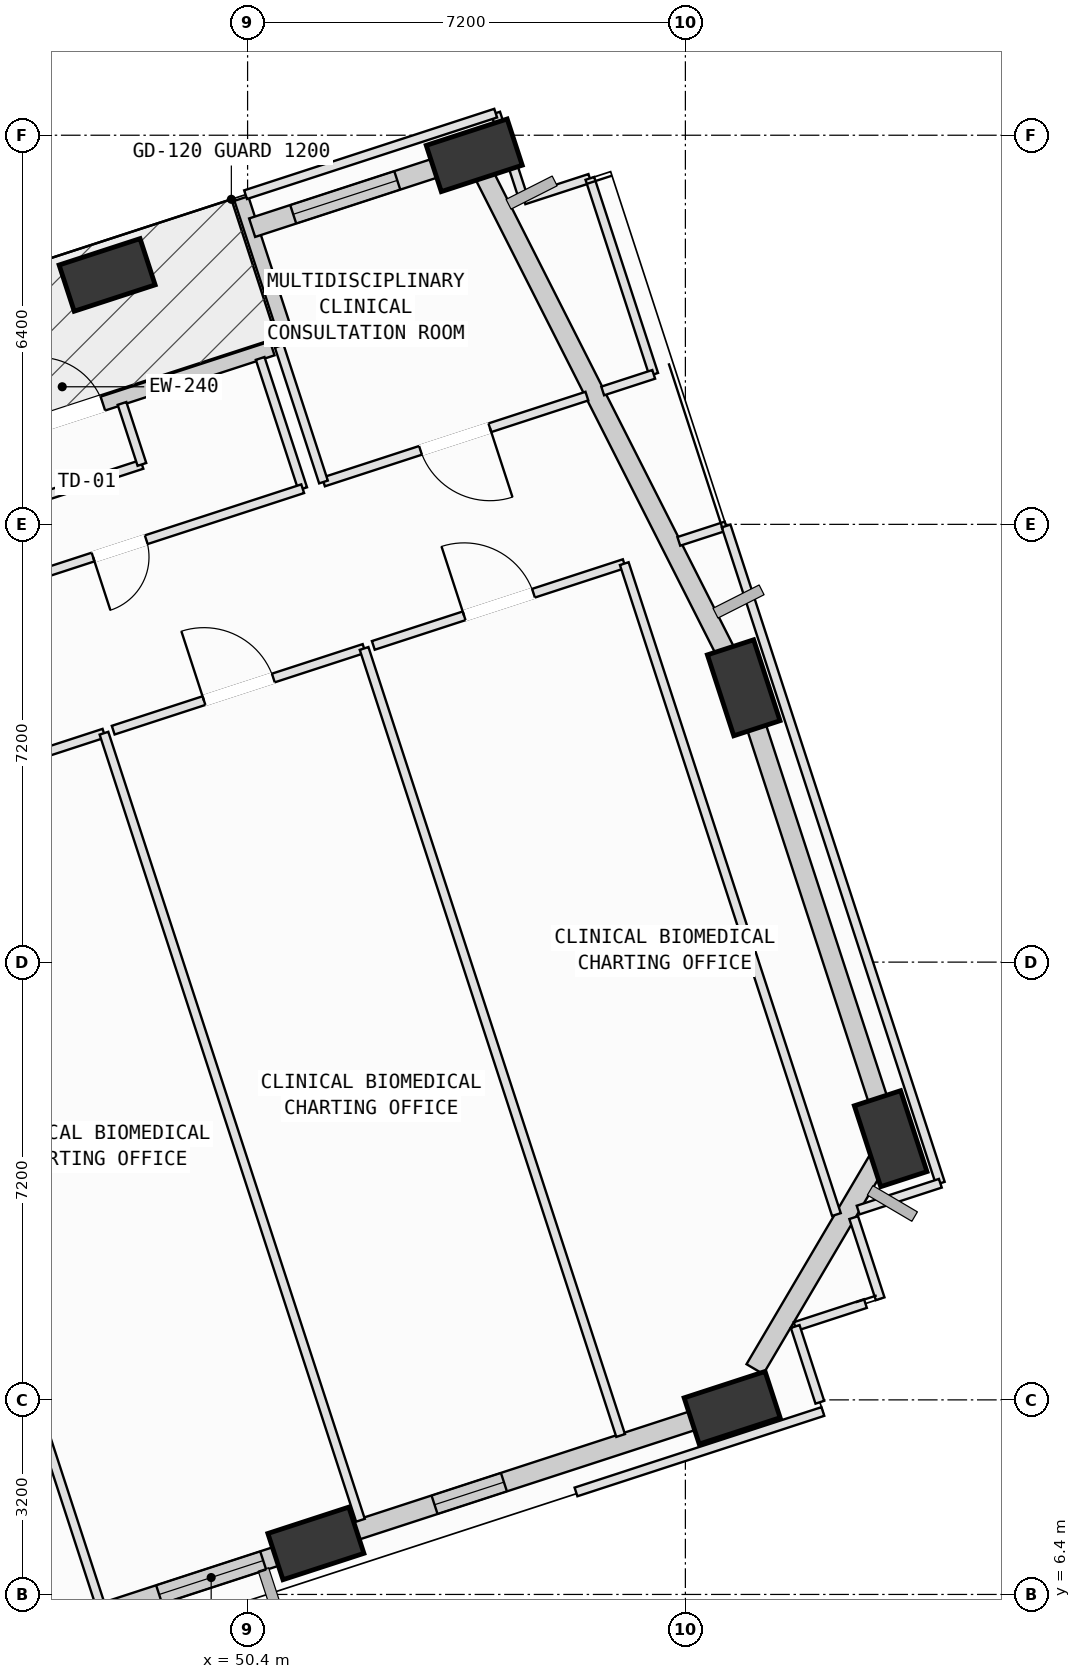
"""IFC4 building model, lengths in metres.
Left out: names, types, materials, properties, quantities, classifications, styles, units other than length and angle.
Written with IfcOpenShell. Run it as: python <this file> out.ifc"""

import sys

from ifc_helpers import new_model, si_unit, direction, frame, frame_2d, origin, origin_2d, place, context, subcontext, project, spatial, rectangle, extrude, element, fill, save


model = new_model("IFC4")
c1 = context("Model", 3, precision=1e-05, world=origin(), true_north=direction((0.0, 1.0)))
c2 = subcontext(c1, "Body", "Model", "MODEL_VIEW")
j1 = project(units=[si_unit("LENGTHUNIT", "METRE"), si_unit("PLANEANGLEUNIT", "RADIAN")], contexts=[c1])
p1 = place(None, origin())
s1 = spatial("IfcSite", under=j1, at=p1, CompositionType="ELEMENT")
p2 = place(p1, origin())
s2 = spatial("IfcBuilding", under=s1, at=p2, CompositionType="ELEMENT")
p3 = place(p2, frame((0.0, 0.0, 100.4)))
s3 = spatial("IfcBuildingStorey", under=s2, at=p3, CompositionType="ELEMENT", Elevation=100.4)
p4 = place(p3, frame((51.523, 7.239, 0.002), z_axis=(0.071761563641, 0.074495916193, 0.994635931612), x_axis=(-0.898565105275, 0.437668320266, 0.032049852079)))
e1 = element("IfcColumn", 1, at=p4, inside=s3, PredefinedType="COLUMN", context=c2, shape_type="SweptSolid", body=[
    extrude(rectangle(XDim=1.4, YDim=0.8, at=origin_2d()), origin(), (0.0, 0.0, 1.0), 4.018),
])
p5 = place(p3, frame((58.369, 9.47, 0.002), z_axis=(0.062287627487, 0.102498627511, 0.992781085044), x_axis=(-0.972270727829, 0.230886401059, 0.037163175496)))
e2 = element("IfcColumn", 2, at=p5, inside=s3, PredefinedType="COLUMN", context=c2, shape_type="SweptSolid", body=[
    extrude(rectangle(XDim=1.4, YDim=0.8, at=origin_2d()), origin(), (0.0, 0.0, 1.0), 4.025),
])
p6 = place(p3, frame((60.976, 13.896, 0.002), z_axis=(0.043903862895, 0.112973614052, 0.992627530019), x_axis=(-0.053058431268, -0.991919647374, 0.115239819616)))
e3 = element("IfcColumn", 3, at=p6, inside=s3, PredefinedType="COLUMN", context=c2, shape_type="SweptSolid", body=[
    extrude(rectangle(XDim=1.4, YDim=0.8, at=origin_2d()), origin(), (0.0, 0.0, 1.0), 4.026),
])
p7 = place(p3, frame((58.559, 21.312, 0.002), z_axis=(0.013549612723, 0.102989208816, 0.994590182368), x_axis=(0.183850511689, -0.977979831198, 0.098764564101)))
e4 = element("IfcColumn", 4, at=p7, inside=s3, PredefinedType="COLUMN", context=c2, shape_type="SweptSolid", body=[
    extrude(rectangle(XDim=1.4, YDim=0.8, at=origin_2d()), origin(), (0.0, 0.0, 1.0), 4.018),
])
p8 = place(p3, frame((54.127, 30.07, 0.002), z_axis=(-0.02245610829, 0.084590760225, 0.99616270081), x_axis=(-0.839761275126, -0.542278170496, 0.027118012491)))
e5 = element("IfcColumn", 5, at=p8, inside=s3, PredefinedType="COLUMN", context=c2, shape_type="SweptSolid", body=[
    extrude(rectangle(XDim=1.4, YDim=0.8, at=origin_2d()), origin(), (0.0, 0.0, 1.0), 4.012),
])
p9 = place(p3, frame((48.09, 28.102, 0.002), z_axis=(-0.014146332364, 0.059817034695, 0.998109114096), x_axis=(-0.854089030519, -0.519778031459, 0.019045365861)))
e6 = element("IfcColumn", 6, at=p9, inside=s3, PredefinedType="COLUMN", context=c2, shape_type="SweptSolid", body=[
    extrude(rectangle(XDim=1.4, YDim=0.8, at=origin_2d()), origin(), (0.0, 0.0, 1.0), 4.004),
])
p10 = place(p3, frame((44.188, 24.738, 0.0), z_axis=(0.0, 0.0, 1.0), x_axis=(0.950787586952, 0.309843451597, 0.0)))
e7 = element("IfcWall", 7, at=p10, inside=s3, PredefinedType="SOLIDWALL", context=c2, shape_type="SweptSolid", body=[
    extrude(rectangle(XDim=6.96, YDim=0.24, at=frame_2d((3.48, 0.0))), origin(), (0.0, 0.0, 1.0), 2.945),
])
p11 = place(p10, frame((2.93, 0.0, 0.0)))
e8 = element("IfcOpeningElement", 8, at=p11, cuts=e7, PredefinedType="OPENING", context=c2, shape_type="SweptSolid", body=[
    extrude(rectangle(XDim=1.1, YDim=2.15, at=frame_2d((0.55, 1.075))), frame((0.0, 0.13, 0.0), z_axis=(0.0, -1.0, 0.0), x_axis=(1.0, 0.0, 0.0)), (0.0, 0.0, 1.0), 0.26),
])
p12 = place(p3, frame((51.072, 26.981, 0.0), z_axis=(0.0, 0.0, 1.0), x_axis=(-0.309774960552, 0.950809904142, 0.0)))
e9 = element("IfcWall", 9, at=p12, inside=s3, PredefinedType="SOLIDWALL", context=c2, shape_type="SweptSolid", body=[
    extrude(rectangle(XDim=2.5, YDim=0.24, at=frame_2d((1.25, 0.0))), origin(), (0.0, 0.0, 1.0), 3.165),
])
p13 = place(p3, frame((51.235, 7.146, 0.0), z_axis=(0.0, 0.0, 1.0), x_axis=(-0.950785923173, -0.309848557034, 0.0)))
e10 = element("IfcWall", 10, at=p13, inside=s3, PredefinedType="SOLIDWALL", context=c2, shape_type="SweptSolid", body=[
    extrude(rectangle(XDim=6.219, YDim=0.32, at=frame_2d((3.109, 0.0))), origin(), (0.0, 0.0, 1.0), 3.165),
])
p14 = place(p13, frame((0.608, 0.0, 0.75)))
e11 = element("IfcOpeningElement", 11, at=p14, cuts=e10, PredefinedType="OPENING", context=c2, shape_type="SweptSolid", body=[
    extrude(rectangle(XDim=1.8, YDim=2.05, at=frame_2d((0.9, 1.025))), frame((0.0, 0.17, 0.0), z_axis=(0.0, -1.0, 0.0), x_axis=(1.0, 0.0, 0.0)), (0.0, 0.0, 1.0), 0.34),
])
p15 = place(p3, frame((58.096, 9.381, 0.0), z_axis=(0.0, 0.0, 1.0), x_axis=(-0.950793220237, -0.309826164729, 0.0)))
e12 = element("IfcWall", 12, at=p15, inside=s3, PredefinedType="SOLIDWALL", context=c2, shape_type="SweptSolid", body=[
    extrude(rectangle(XDim=6.242, YDim=0.32, at=frame_2d((3.121, 0.0))), origin(), (0.0, 0.0, 1.0), 3.165),
])
p16 = place(p15, frame((3.66, 0.0, 0.75)))
e13 = element("IfcOpeningElement", 13, at=p16, cuts=e12, PredefinedType="OPENING", context=c2, shape_type="SweptSolid", body=[
    extrude(rectangle(XDim=1.2, YDim=1.75, at=frame_2d((0.6, 0.875))), frame((0.0, 0.17, 0.0), z_axis=(0.0, -1.0, 0.0), x_axis=(1.0, 0.0, 0.0)), (0.0, 0.0, 1.0), 0.34),
])
p17 = place(p3, frame((60.847, 13.677, 0.0), z_axis=(0.0, 0.0, 1.0), x_axis=(-0.507532261073, -0.861632754699, 0.0)))
e14 = element("IfcWall", 14, at=p17, inside=s3, PredefinedType="SOLIDWALL", context=c2, shape_type="SweptSolid", body=[
    extrude(rectangle(XDim=4.145, YDim=0.32, at=frame_2d((2.073, 0.0))), origin(), (0.0, 0.0, 1.0), 3.165),
])
p18 = place(p3, frame((58.652, 21.027, 0.0), z_axis=(0.0, 0.0, 1.0), x_axis=(0.30984946438, -0.95078562748, 0.0)))
e15 = element("IfcWall", 15, at=p18, inside=s3, PredefinedType="SOLIDWALL", context=c2, shape_type="SweptSolid", body=[
    extrude(rectangle(XDim=6.84, YDim=0.32, at=frame_2d((3.42, 0.0))), origin(), (0.0, 0.0, 1.0), 3.165),
])
p19 = place(p3, frame((54.273, 29.781, 0.0), z_axis=(0.0, 0.0, 1.0), x_axis=(0.451528911485, -0.892256488961, 0.0)))
e16 = element("IfcWall", 16, at=p19, inside=s3, PredefinedType="SOLIDWALL", context=c2, shape_type="SweptSolid", body=[
    extrude(rectangle(XDim=8.838, YDim=0.32, at=frame_2d((4.419, 0.0))), origin(), (0.0, 0.0, 1.0), 3.165),
])
p20 = place(p3, frame((50.475, 28.879, 0.0), z_axis=(0.0, 0.0, 1.0), x_axis=(0.950788010737, 0.309842151164, 0.0)))
e17 = element("IfcWall", 17, at=p20, inside=s3, PredefinedType="SOLIDWALL", context=c2, shape_type="SweptSolid", body=[
    extrude(rectangle(XDim=3.387, YDim=0.32, at=frame_2d((1.694, 0.0))), origin(), (0.0, 0.0, 1.0), 2.945),
])
p21 = place(p20, frame((0.711, 0.0, 0.75)))
e18 = element("IfcOpeningElement", 18, at=p21, cuts=e17, PredefinedType="OPENING", context=c2, shape_type="SweptSolid", body=[
    extrude(rectangle(XDim=1.8, YDim=2.05, at=frame_2d((0.9, 1.025))), frame((0.0, 0.17, 0.0), z_axis=(0.0, -1.0, 0.0), x_axis=(1.0, 0.0, 0.0)), (0.0, 0.0, 1.0), 0.34),
])
p22 = place(p3, frame((43.759, 19.171, 0.0), z_axis=(0.0, 0.0, 1.0), x_axis=(0.309878245527, -0.950776247573, 0.0)))
e19 = element("IfcWall", 19, at=p22, inside=s3, PredefinedType="PARTITIONING", context=c2, shape_type="SweptSolid", body=[
    extrude(rectangle(XDim=13.615, YDim=0.15, at=frame_2d((6.808, 0.0))), origin(), (0.0, 0.0, 1.0), 3.78),
])
p23 = place(p3, frame((43.911, 19.22, 0.0), z_axis=(0.0, 0.0, 1.0), x_axis=(0.950787843692, 0.309842663762, 0.0)))
e20 = element("IfcWall", 20, at=p23, inside=s3, PredefinedType="PARTITIONING", context=c2, shape_type="SweptSolid", body=[
    extrude(rectangle(XDim=4.341, YDim=0.15, at=frame_2d((2.17, 0.0))), origin(), (0.0, 0.0, 1.0), 3.78),
])
p24 = place(p23, frame((1.57, 0.0, 0.0)))
e21 = element("IfcOpeningElement", 21, at=p24, cuts=e20, PredefinedType="OPENING", context=c2, shape_type="SweptSolid", body=[
    extrude(rectangle(XDim=1.2, YDim=2.15, at=frame_2d((0.6, 1.075))), frame((0.0, 0.085, 0.0), z_axis=(0.0, -1.0, 0.0), x_axis=(1.0, 0.0, 0.0)), (0.0, 0.0, 1.0), 0.17),
])
p25 = place(p3, frame((48.038, 20.565, 0.0), z_axis=(0.0, 0.0, 1.0), x_axis=(0.309813403984, -0.950797378368, 0.0)))
e22 = element("IfcWall", 22, at=p25, inside=s3, PredefinedType="PARTITIONING", context=c2, shape_type="SweptSolid", body=[
    extrude(rectangle(XDim=13.615, YDim=0.15, at=frame_2d((6.807, 0.0))), origin(), (0.0, 0.0, 1.0), 3.78),
])
p26 = place(p3, frame((52.232, 7.228, 0.0), z_axis=(0.0, 0.0, 1.0), x_axis=(-0.95091781001, -0.309443562877, 0.0)))
e23 = element("IfcWall", 23, at=p26, inside=s3, PredefinedType="PARTITIONING", context=c2, shape_type="SweptSolid", body=[
    extrude(rectangle(XDim=0.973, YDim=0.15, at=frame_2d((0.486, 0.0))), origin(), (0.0, 0.0, 1.0), 3.165),
])
p27 = place(p3, frame((48.19, 20.615, 0.0), z_axis=(0.0, 0.0, 1.0), x_axis=(0.950827127497, 0.309722090939, 0.0)))
e24 = element("IfcWall", 24, at=p27, inside=s3, PredefinedType="PARTITIONING", context=c2, shape_type="SweptSolid", body=[
    extrude(rectangle(XDim=4.339, YDim=0.15, at=frame_2d((2.17, 0.0))), origin(), (0.0, 0.0, 1.0), 3.78),
])
p28 = place(p27, frame((1.57, 0.0, 0.0)))
e25 = element("IfcOpeningElement", 25, at=p28, cuts=e24, PredefinedType="OPENING", context=c2, shape_type="SweptSolid", body=[
    extrude(rectangle(XDim=1.2, YDim=2.15, at=frame_2d((0.6, 1.075))), frame((0.0, 0.085, 0.0), z_axis=(0.0, -1.0, 0.0), x_axis=(1.0, 0.0, 0.0)), (0.0, 0.0, 1.0), 0.17),
])
p29 = place(p3, frame((52.316, 21.959, 0.0), z_axis=(0.0, 0.0, 1.0), x_axis=(0.309872962478, -0.950777969415, 0.0)))
e26 = element("IfcWall", 26, at=p29, inside=s3, PredefinedType="PARTITIONING", context=c2, shape_type="SweptSolid", body=[
    extrude(rectangle(XDim=13.615, YDim=0.15, at=frame_2d((6.808, 0.0))), origin(), (0.0, 0.0, 1.0), 3.78),
])
p30 = place(p3, frame((52.468, 22.009, 0.0), z_axis=(0.0, 0.0, 1.0), x_axis=(0.950782443792, 0.309859233486, 0.0)))
e27 = element("IfcWall", 27, at=p30, inside=s3, PredefinedType="PARTITIONING", context=c2, shape_type="SweptSolid", body=[
    extrude(rectangle(XDim=4.341, YDim=0.15, at=frame_2d((2.17, 0.0))), origin(), (0.0, 0.0, 1.0), 3.78),
])
p31 = place(p30, frame((1.57, 0.0, 0.0)))
e28 = element("IfcOpeningElement", 28, at=p31, cuts=e27, PredefinedType="OPENING", context=c2, shape_type="SweptSolid", body=[
    extrude(rectangle(XDim=1.2, YDim=2.15, at=frame_2d((0.6, 1.075))), frame((0.0, 0.085, 0.0), z_axis=(0.0, -1.0, 0.0), x_axis=(1.0, 0.0, 0.0)), (0.0, 0.0, 1.0), 0.17),
])
p32 = place(p3, frame((56.595, 23.354, 0.0), z_axis=(0.0, 0.0, 1.0), x_axis=(0.309852735719, -0.950784561385, 0.0)))
e29 = element("IfcWall", 29, at=p32, inside=s3, PredefinedType="PARTITIONING", context=c2, shape_type="SweptSolid", body=[
    extrude(rectangle(XDim=11.26, YDim=0.15, at=frame_2d((5.63, 0.0))), origin(), (0.0, 0.0, 1.0), 3.78),
])
p33 = place(p3, frame((60.561, 11.184, 0.0), z_axis=(0.0, 0.0, 1.0), x_axis=(-0.950594566271, -0.310435131027, 0.0)))
e30 = element("IfcWall", 30, at=p33, inside=s3, PredefinedType="PARTITIONING", context=c2, shape_type="SweptSolid", body=[
    extrude(rectangle(XDim=1.215, YDim=0.15, at=frame_2d((0.607, 0.0))), origin(), (0.0, 0.0, 1.0), 3.78),
])
p34 = place(p3, frame((59.406, 10.807, 0.0), z_axis=(0.0, 0.0, 1.0), x_axis=(0.30917456398, -0.951005304395, 0.0)))
e31 = element("IfcWall", 31, at=p34, inside=s3, PredefinedType="PARTITIONING", context=c2, shape_type="SweptSolid", body=[
    extrude(rectangle(XDim=1.31, YDim=0.15, at=frame_2d((0.655, 0.0))), origin(), (0.0, 0.0, 1.0), 3.78),
])
p35 = place(p3, frame((47.045, 24.459, 0.0), z_axis=(0.0, 0.0, 1.0), x_axis=(0.950772136808, 0.309890857996, 0.0)))
e32 = element("IfcWall", 32, at=p35, inside=s3, PredefinedType="PARTITIONING", context=c2, shape_type="SweptSolid", body=[
    extrude(rectangle(XDim=1.701, YDim=0.15, at=frame_2d((0.851, 0.0))), origin(), (0.0, 0.0, 1.0), 3.78),
])
p36 = place(p3, frame((48.662, 24.986, 0.0), z_axis=(0.0, 0.0, 1.0), x_axis=(-0.310111547753, 0.950700177738, 0.0)))
e33 = element("IfcWall", 33, at=p36, inside=s3, PredefinedType="PARTITIONING", context=c2, shape_type="SweptSolid", body=[
    extrude(rectangle(XDim=1.055, YDim=0.15, at=frame_2d((0.527, 0.0))), origin(), (0.0, 0.0, 1.0), 3.78),
])
p37 = place(p3, frame((50.607, 26.729, 0.0), z_axis=(0.0, 0.0, 1.0), x_axis=(0.310080188362, -0.950710406373, 0.0)))
e34 = element("IfcWall", 34, at=p37, inside=s3, PredefinedType="PARTITIONING", context=c2, shape_type="SweptSolid", body=[
    extrude(rectangle(XDim=2.254, YDim=0.15, at=frame_2d((1.127, 0.0))), origin(), (0.0, 0.0, 1.0), 3.78),
])
p38 = place(p3, frame((51.306, 24.586, 0.0), z_axis=(0.0, 0.0, 1.0), x_axis=(-0.950782697814, -0.309858454036, 0.0)))
e35 = element("IfcWall", 35, at=p38, inside=s3, PredefinedType="PARTITIONING", context=c2, shape_type="SweptSolid", body=[
    extrude(rectangle(XDim=6.332, YDim=0.15, at=frame_2d((3.166, 0.0))), origin(), (0.0, 0.0, 1.0), 3.78),
])
p39 = place(p38, frame((2.706, 0.0, 0.0)))
e36 = element("IfcOpeningElement", 36, at=p39, cuts=e35, PredefinedType="OPENING", context=c2, shape_type="SweptSolid", body=[
    extrude(rectangle(XDim=0.92, YDim=2.1, at=frame_2d((0.46, 1.05))), frame((0.0, 0.085, 0.0), z_axis=(0.0, -1.0, 0.0), x_axis=(1.0, 0.0, 0.0)), (0.0, 0.0, 1.0), 0.17),
])
p40 = place(p3, frame((54.48, 30.763, 0.0), z_axis=(0.0, 0.0, 1.0), x_axis=(0.310068573935, -0.950714194413, 0.0)))
e37 = element("IfcWall", 37, at=p40, inside=s3, PredefinedType="PARTITIONING", context=c2, shape_type="SweptSolid", body=[
    extrude(rectangle(XDim=1.5, YDim=0.15, at=frame_2d((0.75, 0.0))), origin(), (0.0, 0.0, 1.0), 3.165),
])
p41 = place(p3, frame((54.945, 29.337, 0.0), z_axis=(0.0, 0.0, 1.0), x_axis=(0.950845038359, 0.309667100331, 0.0)))
e38 = element("IfcWall", 38, at=p41, inside=s3, PredefinedType="PARTITIONING", context=c2, shape_type="SweptSolid", body=[
    extrude(rectangle(XDim=1.14, YDim=0.15, at=frame_2d((0.57, 0.0))), origin(), (0.0, 0.0, 1.0), 3.78),
])
p42 = place(p3, frame((56.029, 29.69, 0.0), z_axis=(0.0, 0.0, 1.0), x_axis=(0.309781407725, -0.950807803622, 0.0)))
e39 = element("IfcWall", 39, at=p42, inside=s3, PredefinedType="PARTITIONING", context=c2, shape_type="SweptSolid", body=[
    extrude(rectangle(XDim=3.39, YDim=0.15, at=frame_2d((1.695, 0.0))), origin(), (0.0, 0.0, 1.0), 3.78),
])
p43 = place(p3, frame((57.079, 26.467, 0.0), z_axis=(0.0, 0.0, 1.0), x_axis=(-0.950954739759, -0.309330055005, 0.0)))
e40 = element("IfcWall", 40, at=p43, inside=s3, PredefinedType="PARTITIONING", context=c2, shape_type="SweptSolid", body=[
    extrude(rectangle(XDim=0.882, YDim=0.15, at=frame_2d((0.441, 0.0))), origin(), (0.0, 0.0, 1.0), 3.78),
])
p44 = place(p3, frame((55.98, 26.109, 0.0), z_axis=(0.0, 0.0, 1.0), x_axis=(-0.950778581254, -0.309871085178, 0.0)))
e41 = element("IfcWall", 41, at=p44, inside=s3, PredefinedType="PARTITIONING", context=c2, shape_type="SweptSolid", body=[
    extrude(rectangle(XDim=4.556, YDim=0.15, at=frame_2d((2.278, 0.0))), origin(), (0.0, 0.0, 1.0), 3.78),
])
p45 = place(p44, frame((1.678, 0.0, 0.0)))
e42 = element("IfcOpeningElement", 42, at=p45, cuts=e41, PredefinedType="OPENING", context=c2, shape_type="SweptSolid", body=[
    extrude(rectangle(XDim=1.2, YDim=2.15, at=frame_2d((0.6, 1.075))), frame((0.0, 0.085, 0.0), z_axis=(0.0, -1.0, 0.0), x_axis=(1.0, 0.0, 0.0)), (0.0, 0.0, 1.0), 0.17),
])
p46 = place(p3, frame((51.648, 24.697, 0.0), z_axis=(0.0, 0.0, 1.0), x_axis=(-0.309861333994, 0.950781759236, 0.0)))
e43 = element("IfcWall", 43, at=p46, inside=s3, PredefinedType="PARTITIONING", context=c2, shape_type="SweptSolid", body=[
    extrude(rectangle(XDim=2.35, YDim=0.15, at=frame_2d((1.175, 0.0))), origin(), (0.0, 0.0, 1.0), 3.78),
])
p47 = place(p3, frame((50.367, 29.422, 0.0), z_axis=(0.0, 0.0, 1.0), x_axis=(0.950756233323, 0.309939647024, 0.0)))
e44 = element("IfcWall", 44, at=p47, inside=s3, PredefinedType="PARTITIONING", context=c2, shape_type="SweptSolid", body=[
    extrude(rectangle(XDim=4.326, YDim=0.15, at=frame_2d((2.163, 0.0))), origin(), (0.0, 0.0, 1.0), 2.945),
])
p48 = place(p3, frame((59.861, 9.409, 0.0), z_axis=(0.0, 0.0, 1.0), x_axis=(-0.950794294734, -0.309822867298, 0.0)))
e45 = element("IfcWall", 45, at=p48, inside=s3, PredefinedType="PARTITIONING", context=c2, shape_type="SweptSolid", body=[
    extrude(rectangle(XDim=4.27, YDim=0.15, at=frame_2d((2.135, 0.0))), origin(), (0.0, 0.0, 1.0), 3.78),
])
p49 = place(p3, frame((60.368, 12.598, 0.0), z_axis=(0.0, 0.0, 1.0), x_axis=(0.309856592632, -0.95078330444, 0.0)))
e46 = element("IfcWall", 46, at=p49, inside=s3, PredefinedType="PARTITIONING", context=c2, shape_type="SweptSolid", body=[
    extrude(rectangle(XDim=1.404, YDim=0.15, at=frame_2d((0.702, 0.0))), origin(), (0.0, 0.0, 1.0), 3.78),
])
p50 = place(p3, frame((57.492, 23.72, 0.0), z_axis=(0.0, 0.0, 1.0), x_axis=(0.951014330615, 0.309146798405, 0.0)))
e47 = element("IfcWall", 47, at=p50, inside=s3, PredefinedType="PARTITIONING", context=c2, shape_type="SweptSolid", body=[
    extrude(rectangle(XDim=0.818, YDim=0.15, at=frame_2d((0.409, 0.0))), origin(), (0.0, 0.0, 1.0), 3.78),
])
p51 = place(p3, frame((58.27, 23.973, 0.0), z_axis=(0.0, 0.0, 1.0), x_axis=(0.309862365043, -0.950781423215, 0.0)))
e48 = element("IfcWall", 48, at=p51, inside=s3, PredefinedType="PARTITIONING", context=c2, shape_type="SweptSolid", body=[
    extrude(rectangle(XDim=11.369, YDim=0.15, at=frame_2d((5.685, 0.0))), origin(), (0.0, 0.0, 1.0), 3.165),
])
p52 = place(p3, frame((61.793, 13.163, 0.0), z_axis=(0.0, 0.0, 1.0), x_axis=(-0.950672626568, -0.310195997871, 0.0)))
e49 = element("IfcWall", 49, at=p52, inside=s3, PredefinedType="PARTITIONING", context=c2, shape_type="SweptSolid", body=[
    extrude(rectangle(XDim=1.422, YDim=0.15, at=frame_2d((0.711, 0.0))), origin(), (0.0, 0.0, 1.0), 3.78),
])
p53 = place(p11, origin())
e50 = element("IfcDoor", 50, at=p53, inside=s3, OperationType="SINGLE_SWING_LEFT", PredefinedType="DOOR", context=c2, shape_type="SweptSolid", body=[
    extrude(rectangle(XDim=1.1, YDim=2.15, at=frame_2d((0.55, 1.075))), frame((0.0, 0.025, 0.0), z_axis=(0.0, -1.0, 0.0), x_axis=(1.0, 0.0, 0.0)), (0.0, 0.0, 1.0), 0.05),
])
fill(e8, e50)
p54 = place(p14, origin())
e51 = element("IfcWindow", 51, at=p54, inside=s3, PartitioningType="SINGLE_PANEL", PredefinedType="WINDOW", context=c2, shape_type="SweptSolid", body=[
    extrude(rectangle(XDim=1.8, YDim=2.05, at=frame_2d((0.9, 1.025))), frame((0.0, 0.03, 0.0), z_axis=(0.0, -1.0, 0.0), x_axis=(1.0, 0.0, 0.0)), (0.0, 0.0, 1.0), 0.06),
])
fill(e11, e51)
p55 = place(p16, origin())
e52 = element("IfcWindow", 52, at=p55, inside=s3, PartitioningType="SINGLE_PANEL", PredefinedType="WINDOW", context=c2, shape_type="SweptSolid", body=[
    extrude(rectangle(XDim=1.2, YDim=1.75, at=frame_2d((0.6, 0.875))), frame((0.0, 0.03, 0.0), z_axis=(0.0, -1.0, 0.0), x_axis=(1.0, 0.0, 0.0)), (0.0, 0.0, 1.0), 0.06),
])
fill(e13, e52)
p56 = place(p21, origin())
e53 = element("IfcWindow", 53, at=p56, inside=s3, PartitioningType="SINGLE_PANEL", PredefinedType="WINDOW", context=c2, shape_type="SweptSolid", body=[
    extrude(rectangle(XDim=1.8, YDim=2.05, at=frame_2d((0.9, 1.025))), frame((0.0, 0.03, 0.0), z_axis=(0.0, -1.0, 0.0), x_axis=(1.0, 0.0, 0.0)), (0.0, 0.0, 1.0), 0.06),
])
fill(e18, e53)
p57 = place(p28, origin())
e54 = element("IfcDoor", 54, at=p57, inside=s3, OperationType="SINGLE_SWING_LEFT", PredefinedType="DOOR", context=c2, shape_type="SweptSolid", body=[
    extrude(rectangle(XDim=1.2, YDim=2.15, at=frame_2d((0.6, 1.075))), frame((0.0, 0.025, 0.0), z_axis=(0.0, -1.0, 0.0), x_axis=(1.0, 0.0, 0.0)), (0.0, 0.0, 1.0), 0.05),
])
fill(e25, e54)
p58 = place(p31, origin())
e55 = element("IfcDoor", 55, at=p58, inside=s3, OperationType="SINGLE_SWING_LEFT", PredefinedType="DOOR", context=c2, shape_type="SweptSolid", body=[
    extrude(rectangle(XDim=1.2, YDim=2.15, at=frame_2d((0.6, 1.075))), frame((0.0, 0.025, 0.0), z_axis=(0.0, -1.0, 0.0), x_axis=(1.0, 0.0, 0.0)), (0.0, 0.0, 1.0), 0.05),
])
fill(e28, e55)
p59 = place(p39, origin())
e56 = element("IfcDoor", 56, at=p59, inside=s3, OperationType="SINGLE_SWING_RIGHT", PredefinedType="DOOR", context=c2, shape_type="SweptSolid", body=[
    extrude(rectangle(XDim=0.92, YDim=2.1, at=frame_2d((0.46, 1.05))), frame((0.0, 0.025, 0.0), z_axis=(0.0, -1.0, 0.0), x_axis=(1.0, 0.0, 0.0)), (0.0, 0.0, 1.0), 0.05),
])
fill(e36, e56)
p60 = place(p45, origin())
e57 = element("IfcDoor", 57, at=p60, inside=s3, OperationType="SINGLE_SWING_LEFT", PredefinedType="DOOR", context=c2, shape_type="SweptSolid", body=[
    extrude(rectangle(XDim=1.2, YDim=2.15, at=frame_2d((0.6, 1.075))), frame((0.0, 0.025, 0.0), z_axis=(0.0, -1.0, 0.0), x_axis=(1.0, 0.0, 0.0)), (0.0, 0.0, 1.0), 0.05),
])
fill(e42, e57)
save(model, sys.argv[1])
